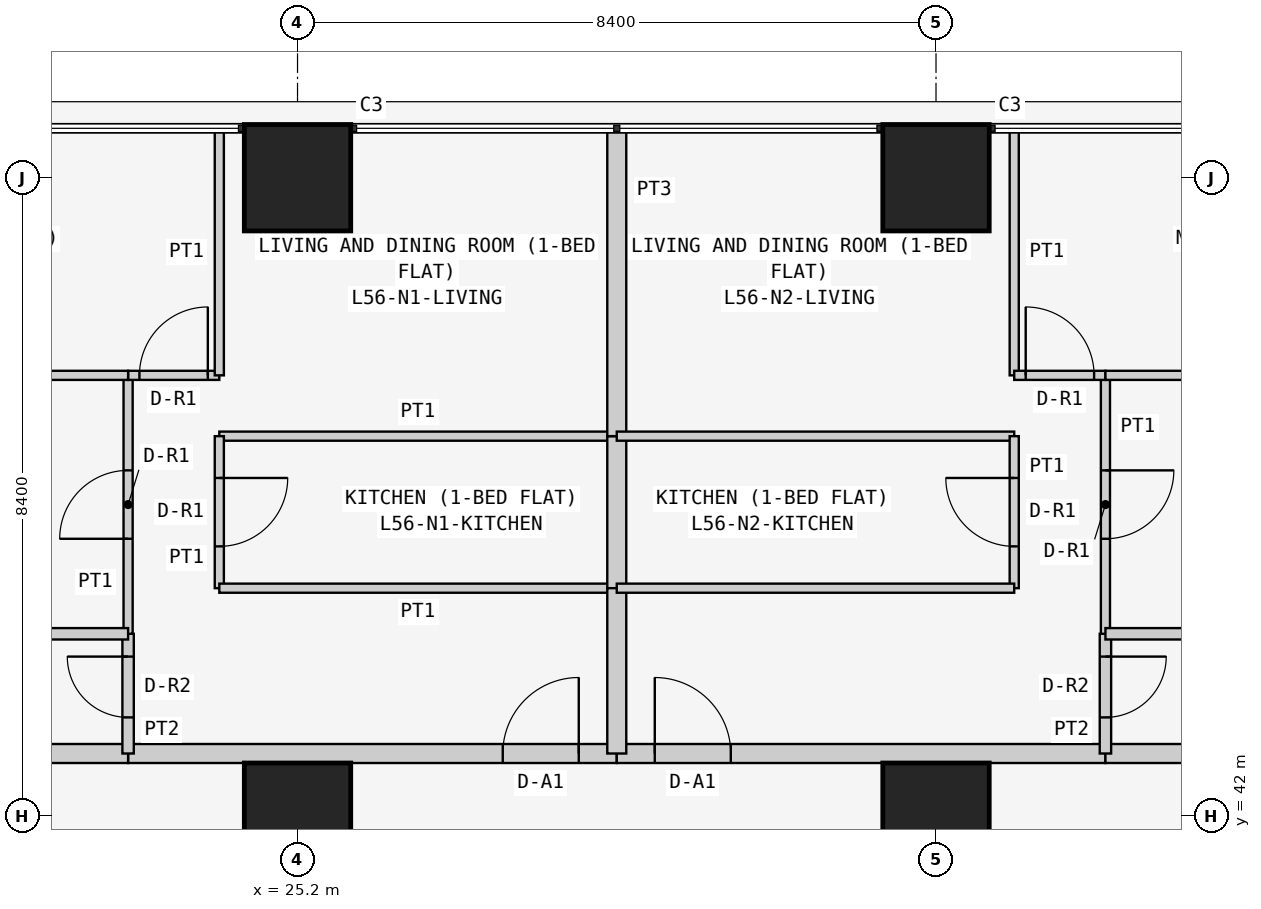
"""IFC4 building model, lengths in metres.
Left out: names, types, materials, properties, quantities, classifications, styles, units other than length and angle.
Written with IfcOpenShell. Run it as: python <this file> out.ifc"""

import sys

from ifc_helpers import new_model, si_unit, direction, frame, frame_2d, origin, origin_2d, place, context, subcontext, project, spatial, rectangle, extrude, element, fill, save


model = new_model("IFC4")
c1 = context("Model", 3, precision=1e-05, world=origin(), true_north=direction((0.0, 1.0)))
c2 = subcontext(c1, "Body", "Model", "MODEL_VIEW")
j1 = project(units=[si_unit("LENGTHUNIT", "METRE"), si_unit("PLANEANGLEUNIT", "RADIAN")], contexts=[c1])
p1 = place(None, origin())
s1 = spatial("IfcSite", under=j1, at=p1, CompositionType="ELEMENT")
p2 = place(p1, origin())
s2 = spatial("IfcBuilding", under=s1, at=p2, CompositionType="ELEMENT")
p3 = place(p2, frame((0.0, 0.0, 215.7)))
s3 = spatial("IfcBuildingStorey", under=s2, at=p3, CompositionType="ELEMENT", Elevation=215.7)
for number, where, z_axis, x_axis in (
    (1, (25.2, 42.0, 0.0), (0.0, 0.0, 1.0), (1.0, 0.0, 0.0)),
    (2, (25.2, 50.4, 0.0), (0.0, 0.0, 1.0), (1.0, 0.0, 0.0)),
    (3, (33.6, 42.0, 0.0), (0.0, 0.0, 1.0), (1.0, 0.0, 0.0)),
    (4, (33.6, 50.4, 0.0), (0.0, 0.0, 1.0), (1.0, 0.0, 0.0)),
):
    element("IfcColumn", number, at=place(p3, frame(where, z_axis=z_axis, x_axis=x_axis)), inside=s3, PredefinedType="COLUMN", context=c2, shape_type="SweptSolid", body=[
        extrude(rectangle(XDim=1.4, YDim=1.4, at=origin_2d()), origin(), (0.0, 0.0, 1.0), 3.6),
    ])
p4 = place(p3, frame((22.971, 42.825, 0.0), z_axis=(0.0, 0.0, 1.0), x_axis=(1.0, 0.0, 0.0)))
e5 = element("IfcWall", 5, at=p4, inside=s3, PredefinedType="PARTITIONING", context=c2, shape_type="SweptSolid", body=[
    extrude(rectangle(XDim=6.429, YDim=0.25, at=frame_2d((3.214, 0.0))), origin(), (0.0, 0.0, 1.0), 3.45),
])
p5 = place(p4, frame((4.929, 0.0, 0.0)))
e6 = element("IfcOpeningElement", 6, at=p5, cuts=e5, PredefinedType="OPENING", context=c2, shape_type="SweptSolid", body=[
    extrude(rectangle(XDim=1.0, YDim=2.1, at=frame_2d((0.5, 1.05))), frame((0.0, 0.135, 0.0), z_axis=(0.0, -1.0, 0.0), x_axis=(1.0, 0.0, 0.0)), (0.0, 0.0, 1.0), 0.27),
])
p6 = place(p3, frame((16.1, 42.825, 0.0), z_axis=(0.0, 0.0, 1.0), x_axis=(1.0, 0.0, 0.0)))
e7 = element("IfcWall", 7, at=p6, inside=s3, PredefinedType="PARTITIONING", context=c2, shape_type="SweptSolid", body=[
    extrude(rectangle(XDim=6.871, YDim=0.25, at=frame_2d((3.436, 0.0))), origin(), (0.0, 0.0, 1.0), 3.45),
])
p7 = place(p3, frame((29.4, 42.825, 0.0), z_axis=(0.0, 0.0, 1.0), x_axis=(1.0, 0.0, 0.0)))
e8 = element("IfcWall", 8, at=p7, inside=s3, PredefinedType="PARTITIONING", context=c2, shape_type="SweptSolid", body=[
    extrude(rectangle(XDim=6.429, YDim=0.25, at=frame_2d((3.215, 0.0))), origin(), (0.0, 0.0, 1.0), 3.45),
])
p8 = place(p7, frame((0.5, 0.0, 0.0)))
e9 = element("IfcOpeningElement", 9, at=p8, cuts=e8, PredefinedType="OPENING", context=c2, shape_type="SweptSolid", body=[
    extrude(rectangle(XDim=1.0, YDim=2.1, at=frame_2d((0.5, 1.05))), frame((0.0, 0.135, 0.0), z_axis=(0.0, -1.0, 0.0), x_axis=(1.0, 0.0, 0.0)), (0.0, 0.0, 1.0), 0.27),
])
p9 = place(p3, frame((35.829, 42.825, 0.0), z_axis=(0.0, 0.0, 1.0), x_axis=(1.0, 0.0, 0.0)))
e10 = element("IfcWall", 10, at=p9, inside=s3, PredefinedType="PARTITIONING", context=c2, shape_type="SweptSolid", body=[
    extrude(rectangle(XDim=6.871, YDim=0.25, at=frame_2d((3.436, 0.0))), origin(), (0.0, 0.0, 1.0), 3.45),
])
p10 = place(p3, frame((29.4, 47.0, 0.0), z_axis=(0.0, 0.0, 1.0), x_axis=(-1.0, 0.0, 0.0)))
e11 = element("IfcWall", 11, at=p10, inside=s3, PredefinedType="PARTITIONING", context=c2, shape_type="SweptSolid", body=[
    extrude(rectangle(XDim=5.229, YDim=0.12, at=frame_2d((2.615, 0.0))), origin(), (0.0, 0.0, 1.0), 3.45),
])
p11 = place(p3, frame((24.171, 47.0, 0.0), z_axis=(0.0, 0.0, 1.0), x_axis=(0.0, -1.0, 0.0)))
e12 = element("IfcWall", 12, at=p11, inside=s3, PredefinedType="PARTITIONING", context=c2, shape_type="SweptSolid", body=[
    extrude(rectangle(XDim=2.0, YDim=0.12, at=frame_2d((1.0, 0.0))), origin(), (0.0, 0.0, 1.0), 3.45),
])
p12 = place(p11, frame((0.55, 0.0, 0.0)))
e13 = element("IfcOpeningElement", 13, at=p12, cuts=e12, PredefinedType="OPENING", context=c2, shape_type="SweptSolid", body=[
    extrude(rectangle(XDim=0.9, YDim=2.1, at=frame_2d((0.45, 1.05))), frame((0.0, 0.07, 0.0), z_axis=(0.0, -1.0, 0.0), x_axis=(1.0, 0.0, 0.0)), (0.0, 0.0, 1.0), 0.14),
])
p13 = place(p3, frame((24.171, 45.0, 0.0), z_axis=(0.0, 0.0, 1.0), x_axis=(1.0, 0.0, 0.0)))
e14 = element("IfcWall", 14, at=p13, inside=s3, PredefinedType="PARTITIONING", context=c2, shape_type="SweptSolid", body=[
    extrude(rectangle(XDim=5.229, YDim=0.12, at=frame_2d((2.615, 0.0))), origin(), (0.0, 0.0, 1.0), 3.45),
])
p14 = place(p3, frame((29.4, 45.0, 0.0), z_axis=(0.0, 0.0, 1.0), x_axis=(0.0, 1.0, 0.0)))
e15 = element("IfcWall", 15, at=p14, inside=s3, PredefinedType="PARTITIONING", context=c2, shape_type="SweptSolid", body=[
    extrude(rectangle(XDim=2.0, YDim=0.25, at=frame_2d((1.0, 0.0))), origin(), (0.0, 0.0, 1.0), 2.848),
])
p15 = place(p3, frame((22.971, 42.825, 0.0), z_axis=(0.0, 0.0, 1.0), x_axis=(0.0, 1.0, 0.0)))
e16 = element("IfcWall", 16, at=p15, inside=s3, PredefinedType="PARTITIONING", context=c2, shape_type="SweptSolid", body=[
    extrude(rectangle(XDim=1.575, YDim=0.15, at=frame_2d((0.788, 0.0))), origin(), (0.0, 0.0, 1.0), 3.45),
])
p16 = place(p15, frame((0.475, 0.0, 0.0)))
e17 = element("IfcOpeningElement", 17, at=p16, cuts=e16, PredefinedType="OPENING", context=c2, shape_type="SweptSolid", body=[
    extrude(rectangle(XDim=0.8, YDim=2.1, at=frame_2d((0.4, 1.05))), frame((0.0, 0.085, 0.0), z_axis=(0.0, -1.0, 0.0), x_axis=(1.0, 0.0, 0.0)), (0.0, 0.0, 1.0), 0.17),
])
p17 = place(p3, frame((22.971, 44.4, 0.0), z_axis=(0.0, 0.0, 1.0), x_axis=(0.0, 1.0, 0.0)))
e18 = element("IfcWall", 18, at=p17, inside=s3, PredefinedType="PARTITIONING", context=c2, shape_type="SweptSolid", body=[
    extrude(rectangle(XDim=3.4, YDim=0.12, at=frame_2d((1.7, 0.0))), origin(), (0.0, 0.0, 1.0), 3.45),
])
p18 = place(p17, frame((1.25, 0.0, 0.0)))
e19 = element("IfcOpeningElement", 19, at=p18, cuts=e18, PredefinedType="OPENING", context=c2, shape_type="SweptSolid", body=[
    extrude(rectangle(XDim=0.9, YDim=2.1, at=frame_2d((0.45, 1.05))), frame((0.0, 0.07, 0.0), z_axis=(0.0, -1.0, 0.0), x_axis=(1.0, 0.0, 0.0)), (0.0, 0.0, 1.0), 0.14),
])
p19 = place(p3, frame((22.971, 47.8, 0.0), z_axis=(0.0, 0.0, 1.0), x_axis=(1.0, 0.0, 0.0)))
e20 = element("IfcWall", 20, at=p19, inside=s3, PredefinedType="PARTITIONING", context=c2, shape_type="SweptSolid", body=[
    extrude(rectangle(XDim=1.2, YDim=0.12, at=frame_2d((0.6, 0.0))), origin(), (0.0, 0.0, 1.0), 3.45),
])
p20 = place(p19, frame((0.149, 0.0, 0.0)))
e21 = element("IfcOpeningElement", 21, at=p20, cuts=e20, PredefinedType="OPENING", context=c2, shape_type="SweptSolid", body=[
    extrude(rectangle(XDim=0.9, YDim=2.1, at=frame_2d((0.45, 1.05))), frame((0.0, 0.07, 0.0), z_axis=(0.0, -1.0, 0.0), x_axis=(1.0, 0.0, 0.0)), (0.0, 0.0, 1.0), 0.14),
])
p21 = place(p3, frame((24.171, 47.8, 0.0), z_axis=(0.0, 0.0, 1.0), x_axis=(0.0, 1.0, 0.0)))
e22 = element("IfcWall", 22, at=p21, inside=s3, PredefinedType="PARTITIONING", context=c2, shape_type="SweptSolid", body=[
    extrude(rectangle(XDim=3.25, YDim=0.12, at=frame_2d((1.625, 0.0))), origin(), (0.0, 0.0, 1.0), 3.45),
])
p22 = place(p3, frame((29.4, 45.0, 0.0), z_axis=(0.0, 0.0, 1.0), x_axis=(0.0, -1.0, 0.0)))
e23 = element("IfcWall", 23, at=p22, inside=s3, PredefinedType="PARTITIONING", context=c2, shape_type="SweptSolid", body=[
    extrude(rectangle(XDim=2.175, YDim=0.25, at=frame_2d((1.087, 0.0))), origin(), (0.0, 0.0, 1.0), 2.848),
])
p23 = place(p3, frame((29.4, 51.05, 0.0), z_axis=(0.0, 0.0, 1.0), x_axis=(0.0, -1.0, 0.0)))
e24 = element("IfcWall", 24, at=p23, inside=s3, PredefinedType="PARTITIONING", context=c2, shape_type="SweptSolid", body=[
    extrude(rectangle(XDim=4.05, YDim=0.25, at=frame_2d((2.025, 0.0))), origin(), (0.0, 0.0, 1.0), 2.848),
])
p24 = place(p3, frame((22.971, 44.4, 0.0), z_axis=(0.0, 0.0, 1.0), x_axis=(-1.0, 0.0, 0.0)))
e25 = element("IfcWall", 25, at=p24, inside=s3, PredefinedType="PARTITIONING", context=c2, shape_type="SweptSolid", body=[
    extrude(rectangle(XDim=6.871, YDim=0.15, at=frame_2d((3.436, 0.0))), origin(), (0.0, 0.0, 1.0), 3.45),
])
p25 = place(p3, frame((22.971, 47.8, 0.0), z_axis=(0.0, 0.0, 1.0), x_axis=(-1.0, 0.0, 0.0)))
e26 = element("IfcWall", 26, at=p25, inside=s3, PredefinedType="PARTITIONING", context=c2, shape_type="SweptSolid", body=[
    extrude(rectangle(XDim=6.871, YDim=0.12, at=frame_2d((3.436, 0.0))), origin(), (0.0, 0.0, 1.0), 3.45),
])
p26 = place(p3, frame((29.4, 47.0, 0.0), z_axis=(0.0, 0.0, 1.0), x_axis=(1.0, 0.0, 0.0)))
e27 = element("IfcWall", 27, at=p26, inside=s3, PredefinedType="PARTITIONING", context=c2, shape_type="SweptSolid", body=[
    extrude(rectangle(XDim=5.229, YDim=0.12, at=frame_2d((2.615, 0.0))), origin(), (0.0, 0.0, 1.0), 3.45),
])
p27 = place(p3, frame((34.629, 47.0, 0.0), z_axis=(0.0, 0.0, 1.0), x_axis=(0.0, -1.0, 0.0)))
e28 = element("IfcWall", 28, at=p27, inside=s3, PredefinedType="PARTITIONING", context=c2, shape_type="SweptSolid", body=[
    extrude(rectangle(XDim=2.0, YDim=0.12, at=frame_2d((1.0, 0.0))), origin(), (0.0, 0.0, 1.0), 3.45),
])
p28 = place(p27, frame((0.55, 0.0, 0.0)))
e29 = element("IfcOpeningElement", 29, at=p28, cuts=e28, PredefinedType="OPENING", context=c2, shape_type="SweptSolid", body=[
    extrude(rectangle(XDim=0.9, YDim=2.1, at=frame_2d((0.45, 1.05))), frame((0.0, 0.07, 0.0), z_axis=(0.0, -1.0, 0.0), x_axis=(1.0, 0.0, 0.0)), (0.0, 0.0, 1.0), 0.14),
])
p29 = place(p3, frame((34.629, 45.0, 0.0), z_axis=(0.0, 0.0, 1.0), x_axis=(-1.0, 0.0, 0.0)))
e30 = element("IfcWall", 30, at=p29, inside=s3, PredefinedType="PARTITIONING", context=c2, shape_type="SweptSolid", body=[
    extrude(rectangle(XDim=5.229, YDim=0.12, at=frame_2d((2.615, 0.0))), origin(), (0.0, 0.0, 1.0), 3.45),
])
p30 = place(p3, frame((35.829, 44.4, 0.0), z_axis=(0.0, 0.0, 1.0), x_axis=(0.0, -1.0, 0.0)))
e31 = element("IfcWall", 31, at=p30, inside=s3, PredefinedType="PARTITIONING", context=c2, shape_type="SweptSolid", body=[
    extrude(rectangle(XDim=1.575, YDim=0.15, at=frame_2d((0.788, 0.0))), origin(), (0.0, 0.0, 1.0), 3.45),
])
p31 = place(p30, frame((0.3, 0.0, 0.0)))
e32 = element("IfcOpeningElement", 32, at=p31, cuts=e31, PredefinedType="OPENING", context=c2, shape_type="SweptSolid", body=[
    extrude(rectangle(XDim=0.8, YDim=2.1, at=frame_2d((0.4, 1.05))), frame((0.0, 0.085, 0.0), z_axis=(0.0, -1.0, 0.0), x_axis=(1.0, 0.0, 0.0)), (0.0, 0.0, 1.0), 0.17),
])
p32 = place(p3, frame((35.829, 47.8, 0.0), z_axis=(0.0, 0.0, 1.0), x_axis=(0.0, -1.0, 0.0)))
e33 = element("IfcWall", 33, at=p32, inside=s3, PredefinedType="PARTITIONING", context=c2, shape_type="SweptSolid", body=[
    extrude(rectangle(XDim=3.4, YDim=0.12, at=frame_2d((1.7, 0.0))), origin(), (0.0, 0.0, 1.0), 3.45),
])
p33 = place(p32, frame((1.25, 0.0, 0.0)))
e34 = element("IfcOpeningElement", 34, at=p33, cuts=e33, PredefinedType="OPENING", context=c2, shape_type="SweptSolid", body=[
    extrude(rectangle(XDim=0.9, YDim=2.1, at=frame_2d((0.45, 1.05))), frame((0.0, 0.07, 0.0), z_axis=(0.0, -1.0, 0.0), x_axis=(1.0, 0.0, 0.0)), (0.0, 0.0, 1.0), 0.14),
])
p34 = place(p3, frame((34.629, 51.05, 0.0), z_axis=(0.0, 0.0, 1.0), x_axis=(0.0, -1.0, 0.0)))
e35 = element("IfcWall", 35, at=p34, inside=s3, PredefinedType="PARTITIONING", context=c2, shape_type="SweptSolid", body=[
    extrude(rectangle(XDim=3.25, YDim=0.12, at=frame_2d((1.625, 0.0))), origin(), (0.0, 0.0, 1.0), 3.45),
])
p35 = place(p3, frame((34.629, 47.8, 0.0), z_axis=(0.0, 0.0, 1.0), x_axis=(1.0, 0.0, 0.0)))
e36 = element("IfcWall", 36, at=p35, inside=s3, PredefinedType="PARTITIONING", context=c2, shape_type="SweptSolid", body=[
    extrude(rectangle(XDim=1.2, YDim=0.12, at=frame_2d((0.6, 0.0))), origin(), (0.0, 0.0, 1.0), 3.45),
])
p36 = place(p35, frame((0.151, 0.0, 0.0)))
e37 = element("IfcOpeningElement", 37, at=p36, cuts=e36, PredefinedType="OPENING", context=c2, shape_type="SweptSolid", body=[
    extrude(rectangle(XDim=0.9, YDim=2.1, at=frame_2d((0.45, 1.05))), frame((0.0, 0.07, 0.0), z_axis=(0.0, -1.0, 0.0), x_axis=(1.0, 0.0, 0.0)), (0.0, 0.0, 1.0), 0.14),
])
p37 = place(p3, frame((35.829, 44.4, 0.0), z_axis=(0.0, 0.0, 1.0), x_axis=(1.0, 0.0, 0.0)))
e38 = element("IfcWall", 38, at=p37, inside=s3, PredefinedType="PARTITIONING", context=c2, shape_type="SweptSolid", body=[
    extrude(rectangle(XDim=6.871, YDim=0.15, at=frame_2d((3.436, 0.0))), origin(), (0.0, 0.0, 1.0), 3.45),
])
p38 = place(p3, frame((35.829, 47.8, 0.0), z_axis=(0.0, 0.0, 1.0), x_axis=(1.0, 0.0, 0.0)))
e39 = element("IfcWall", 39, at=p38, inside=s3, PredefinedType="PARTITIONING", context=c2, shape_type="SweptSolid", body=[
    extrude(rectangle(XDim=6.871, YDim=0.12, at=frame_2d((3.436, 0.0))), origin(), (0.0, 0.0, 1.0), 3.45),
])
p39 = place(p5, origin())
e40 = element("IfcDoor", 40, at=p39, inside=s3, OperationType="SINGLE_SWING_RIGHT", PredefinedType="DOOR", context=c2, shape_type="SweptSolid", body=[
    extrude(rectangle(XDim=1.0, YDim=2.1, at=frame_2d((0.5, 1.05))), frame((0.0, 0.025, 0.0), z_axis=(0.0, -1.0, 0.0), x_axis=(1.0, 0.0, 0.0)), (0.0, 0.0, 1.0), 0.05),
])
fill(e6, e40)
p40 = place(p12, origin())
e41 = element("IfcDoor", 41, at=p40, inside=s3, OperationType="SINGLE_SWING_LEFT", PredefinedType="DOOR", context=c2, shape_type="SweptSolid", body=[
    extrude(rectangle(XDim=0.9, YDim=2.1, at=frame_2d((0.45, 1.05))), frame((0.0, 0.025, 0.0), z_axis=(0.0, -1.0, 0.0), x_axis=(1.0, 0.0, 0.0)), (0.0, 0.0, 1.0), 0.05),
])
fill(e13, e41)
p41 = place(p16, origin())
e42 = element("IfcDoor", 42, at=p41, inside=s3, OperationType="SINGLE_SWING_RIGHT", PredefinedType="DOOR", context=c2, shape_type="SweptSolid", body=[
    extrude(rectangle(XDim=0.8, YDim=2.1, at=frame_2d((0.4, 1.05))), frame((0.0, 0.025, 0.0), z_axis=(0.0, -1.0, 0.0), x_axis=(1.0, 0.0, 0.0)), (0.0, 0.0, 1.0), 0.05),
])
fill(e17, e42)
p42 = place(p18, origin())
e43 = element("IfcDoor", 43, at=p42, inside=s3, OperationType="SINGLE_SWING_LEFT", PredefinedType="DOOR", context=c2, shape_type="SweptSolid", body=[
    extrude(rectangle(XDim=0.9, YDim=2.1, at=frame_2d((0.45, 1.05))), frame((0.0, 0.025, 0.0), z_axis=(0.0, -1.0, 0.0), x_axis=(1.0, 0.0, 0.0)), (0.0, 0.0, 1.0), 0.05),
])
fill(e19, e43)
p43 = place(p20, origin())
e44 = element("IfcDoor", 44, at=p43, inside=s3, OperationType="SINGLE_SWING_RIGHT", PredefinedType="DOOR", context=c2, shape_type="SweptSolid", body=[
    extrude(rectangle(XDim=0.9, YDim=2.1, at=frame_2d((0.45, 1.05))), frame((0.0, 0.025, 0.0), z_axis=(0.0, -1.0, 0.0), x_axis=(1.0, 0.0, 0.0)), (0.0, 0.0, 1.0), 0.05),
])
fill(e21, e44)
p44 = place(p8, origin())
e45 = element("IfcDoor", 45, at=p44, inside=s3, OperationType="SINGLE_SWING_LEFT", PredefinedType="DOOR", context=c2, shape_type="SweptSolid", body=[
    extrude(rectangle(XDim=1.0, YDim=2.1, at=frame_2d((0.5, 1.05))), frame((0.0, 0.025, 0.0), z_axis=(0.0, -1.0, 0.0), x_axis=(1.0, 0.0, 0.0)), (0.0, 0.0, 1.0), 0.05),
])
fill(e9, e45)
p45 = place(p28, frame((0.9, 0.0, 0.0), z_axis=(0.0, 0.0, 1.0), x_axis=(-1.0, 0.0, 0.0)))
e46 = element("IfcDoor", 46, at=p45, inside=s3, OperationType="SINGLE_SWING_RIGHT", PredefinedType="DOOR", context=c2, shape_type="SweptSolid", body=[
    extrude(rectangle(XDim=0.9, YDim=2.1, at=frame_2d((0.45, 1.05))), frame((0.0, 0.025, 0.0), z_axis=(0.0, -1.0, 0.0), x_axis=(1.0, 0.0, 0.0)), (0.0, 0.0, 1.0), 0.05),
])
fill(e29, e46)
p46 = place(p31, origin())
e47 = element("IfcDoor", 47, at=p46, inside=s3, OperationType="SINGLE_SWING_LEFT", PredefinedType="DOOR", context=c2, shape_type="SweptSolid", body=[
    extrude(rectangle(XDim=0.8, YDim=2.1, at=frame_2d((0.4, 1.05))), frame((0.0, 0.025, 0.0), z_axis=(0.0, -1.0, 0.0), x_axis=(1.0, 0.0, 0.0)), (0.0, 0.0, 1.0), 0.05),
])
fill(e32, e47)
p47 = place(p33, origin())
e48 = element("IfcDoor", 48, at=p47, inside=s3, OperationType="SINGLE_SWING_LEFT", PredefinedType="DOOR", context=c2, shape_type="SweptSolid", body=[
    extrude(rectangle(XDim=0.9, YDim=2.1, at=frame_2d((0.45, 1.05))), frame((0.0, 0.025, 0.0), z_axis=(0.0, -1.0, 0.0), x_axis=(1.0, 0.0, 0.0)), (0.0, 0.0, 1.0), 0.05),
])
fill(e34, e48)
p48 = place(p36, origin())
e49 = element("IfcDoor", 49, at=p48, inside=s3, OperationType="SINGLE_SWING_LEFT", PredefinedType="DOOR", context=c2, shape_type="SweptSolid", body=[
    extrude(rectangle(XDim=0.9, YDim=2.1, at=frame_2d((0.45, 1.05))), frame((0.0, 0.025, 0.0), z_axis=(0.0, -1.0, 0.0), x_axis=(1.0, 0.0, 0.0)), (0.0, 0.0, 1.0), 0.05),
])
fill(e37, e49)
save(model, sys.argv[1])
